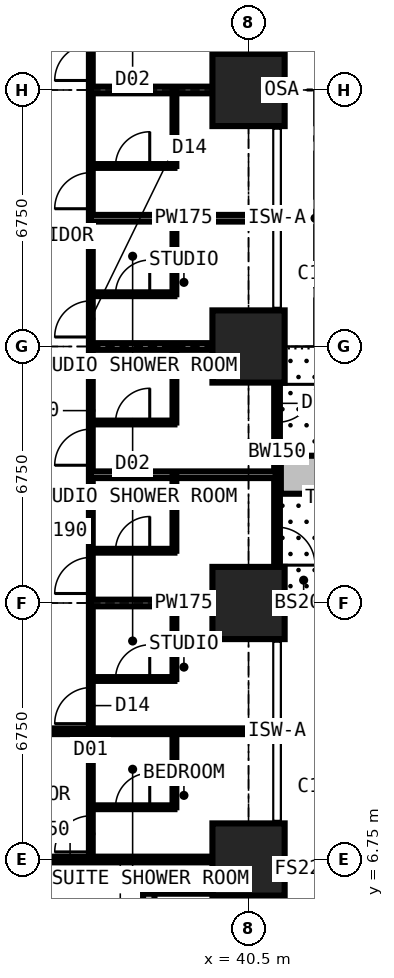
"""IFC4 building model, lengths in metres.
Left out: names, types, materials, properties, quantities, classifications, styles, units other than length and angle.
Written with IfcOpenShell. Run it as: python <this file> out.ifc"""

import sys

from ifc_helpers import new_model, si_unit, direction, frame, frame_2d, origin, origin_2d, place, context, subcontext, project, spatial, rectangle, extrude, element, fill, save


model = new_model("IFC4")
c1 = context("Model", 3, precision=1e-05, world=origin(), true_north=direction((0.0, 1.0)))
c2 = subcontext(c1, "Body", "Model", "MODEL_VIEW")
j1 = project(units=[si_unit("LENGTHUNIT", "METRE"), si_unit("PLANEANGLEUNIT", "RADIAN")], contexts=[c1])
p1 = place(None, origin())
s1 = spatial("IfcSite", under=j1, at=p1, CompositionType="ELEMENT")
p2 = place(p1, origin())
s2 = spatial("IfcBuilding", under=s1, at=p2, CompositionType="ELEMENT")
p3 = place(p2, frame((0.0, 0.0, 32.4)))
s3 = spatial("IfcBuildingStorey", under=s2, at=p3, CompositionType="ELEMENT", Elevation=32.4)
for number, where, z_axis, x_axis in (
    (1, (40.5, 6.75, 0.0), (0.0, 0.0, 1.0), (1.0, 0.0, 0.0)),
    (2, (40.5, 13.5, 0.0), (0.0, 0.0, 1.0), (1.0, 0.0, 0.0)),
    (3, (40.5, 20.25, 0.0), (0.0, 0.0, 1.0), (1.0, 0.0, 0.0)),
    (4, (40.5, 27.0, 0.0), (0.0, 0.0, 1.0), (1.0, 0.0, 0.0)),
):
    element("IfcColumn", number, at=place(p3, frame(where, z_axis=z_axis, x_axis=x_axis)), inside=s3, PredefinedType="COLUMN", context=c2, shape_type="SweptSolid", body=[
        extrude(rectangle(XDim=1.9, YDim=1.9, at=origin_2d()), origin(), (0.0, 0.0, 1.0), 3.6),
    ])
p4 = place(p3, frame((41.25, 20.25, 0.0), z_axis=(0.0, 0.0, 1.0), x_axis=(0.0, -1.0, 0.0)))
e5 = element("IfcWall", 5, at=p4, inside=s3, PredefinedType="SOLIDWALL", context=c2, shape_type="SweptSolid", body=[
    extrude(rectangle(XDim=6.75, YDim=0.15, at=frame_2d((3.375, 0.0))), origin(), (0.0, 0.0, 1.0), 3.375),
])
p5 = place(p4, frame((0.996, 0.0, 0.0)))
e6 = element("IfcOpeningElement", 6, at=p5, cuts=e5, PredefinedType="OPENING", context=c2, shape_type="SweptSolid", body=[
    extrude(rectangle(XDim=1.0, YDim=2.2, at=frame_2d((0.5, 1.1))), frame((0.0, 0.085, 0.0), z_axis=(0.0, -1.0, 0.0), x_axis=(1.0, 0.0, 0.0)), (0.0, 0.0, 1.0), 0.17),
])
p6 = place(p4, frame((2.042, 0.0, 0.9)))
e7 = element("IfcOpeningElement", 7, at=p6, cuts=e5, PredefinedType="OPENING", context=c2, shape_type="SweptSolid", body=[
    extrude(rectangle(XDim=1.2, YDim=1.8, at=frame_2d((0.6, 0.9))), frame((0.0, 0.085, 0.0), z_axis=(0.0, -1.0, 0.0), x_axis=(1.0, 0.0, 0.0)), (0.0, 0.0, 1.0), 0.17),
])
p7 = place(p4, frame((4.754, 0.0, 0.0)))
e8 = element("IfcOpeningElement", 8, at=p7, cuts=e5, PredefinedType="OPENING", context=c2, shape_type="SweptSolid", body=[
    extrude(rectangle(XDim=1.0, YDim=2.2, at=frame_2d((0.5, 1.1))), frame((0.0, 0.085, 0.0), z_axis=(0.0, -1.0, 0.0), x_axis=(1.0, 0.0, 0.0)), (0.0, 0.0, 1.0), 0.17),
])
p8 = place(p4, frame((3.508, 0.0, 0.9)))
e9 = element("IfcOpeningElement", 9, at=p8, cuts=e5, PredefinedType="OPENING", context=c2, shape_type="SweptSolid", body=[
    extrude(rectangle(XDim=1.2, YDim=1.8, at=frame_2d((0.6, 0.9))), frame((0.0, 0.085, 0.0), z_axis=(0.0, -1.0, 0.0), x_axis=(1.0, 0.0, 0.0)), (0.0, 0.0, 1.0), 0.17),
])
p9 = place(p3, frame((37.875, 2.625, 0.0), z_axis=(0.0, 0.0, 1.0), x_axis=(0.0, 1.0, 0.0)))
e10 = element("IfcWall", 10, at=p9, inside=s3, PredefinedType="SOLIDWALL", context=c2, shape_type="SweptSolid", body=[
    extrude(rectangle(XDim=3.375, YDim=0.3, at=frame_2d((1.688, 0.0))), origin(), (0.0, 0.0, 1.0), 3.375),
])
p10 = place(p9, frame((0.788, 0.0, 0.6)))
e11 = element("IfcOpeningElement", 11, at=p10, cuts=e10, PredefinedType="OPENING", context=c2, shape_type="SweptSolid", body=[
    extrude(rectangle(XDim=1.8, YDim=2.1, at=frame_2d((0.9, 1.05))), frame((0.0, 0.16, 0.0), z_axis=(0.0, -1.0, 0.0), x_axis=(1.0, 0.0, 0.0)), (0.0, 0.0, 1.0), 0.32),
])
p11 = place(p3, frame((37.875, 6.0, 0.0), z_axis=(0.0, 0.0, 1.0), x_axis=(1.0, 0.0, 0.0)))
e12 = element("IfcWall", 12, at=p11, inside=s3, PredefinedType="SOLIDWALL", context=c2, shape_type="SweptSolid", body=[
    extrude(rectangle(XDim=3.375, YDim=0.3, at=frame_2d((1.688, 0.0))), origin(), (0.0, 0.0, 1.0), 3.375),
])
p12 = place(p11, frame((0.317, 0.0, 0.9)))
e13 = element("IfcOpeningElement", 13, at=p12, cuts=e12, PredefinedType="OPENING", context=c2, shape_type="SweptSolid", body=[
    extrude(rectangle(XDim=1.2, YDim=1.8, at=frame_2d((0.6, 0.9))), frame((0.0, 0.16, 0.0), z_axis=(0.0, -1.0, 0.0), x_axis=(1.0, 0.0, 0.0)), (0.0, 0.0, 1.0), 0.32),
])
p13 = place(p3, frame((41.35, 16.875, 0.0), z_axis=(0.0, 0.0, 1.0), x_axis=(1.0, 0.0, 0.0)))
e14 = element("IfcWall", 14, at=p13, inside=s3, PredefinedType="USERDEFINED", context=c2, shape_type="SweptSolid", body=[
    extrude(rectangle(XDim=2.2, YDim=1.0, at=frame_2d((1.1, 0.0))), origin(), (0.0, 0.0, 1.0), 0.9),
])
p14 = place(p3, frame((30.375, 6.75, 0.0), z_axis=(0.0, 0.0, 1.0), x_axis=(1.0, 0.0, 0.0)))
e15 = element("IfcWall", 15, at=p14, inside=s3, PredefinedType="PARTITIONING", context=c2, shape_type="SweptSolid", body=[
    extrude(rectangle(XDim=10.859, YDim=0.15, at=frame_2d((5.429, 0.0))), origin(), (0.0, 0.0, 1.0), 2.877),
])
p15 = place(p14, frame((1.4, 0.0, 0.0)))
e16 = element("IfcOpeningElement", 16, at=p15, cuts=e15, PredefinedType="OPENING", context=c2, shape_type="SweptSolid", body=[
    extrude(rectangle(XDim=1.0, YDim=2.2, at=frame_2d((0.5, 1.1))), frame((0.0, 0.085, 0.0), z_axis=(0.0, -1.0, 0.0), x_axis=(1.0, 0.0, 0.0)), (0.0, 0.0, 1.0), 0.17),
])
p16 = place(p3, frame((30.375, 10.125, 0.0), z_axis=(0.0, 0.0, 1.0), x_axis=(1.0, 0.0, 0.0)))
e17 = element("IfcWall", 17, at=p16, inside=s3, PredefinedType="PARTITIONING", context=c2, shape_type="SweptSolid", body=[
    extrude(rectangle(XDim=10.859, YDim=0.15, at=frame_2d((5.429, 0.0))), origin(), (0.0, 0.0, 1.0), 3.375),
])
p17 = place(p16, frame((2.5, 0.0, 0.0)))
e18 = element("IfcOpeningElement", 18, at=p17, cuts=e17, PredefinedType="OPENING", context=c2, shape_type="SweptSolid", body=[
    extrude(rectangle(XDim=1.0, YDim=2.2, at=frame_2d((0.5, 1.1))), frame((0.0, 0.085, 0.0), z_axis=(0.0, -1.0, 0.0), x_axis=(1.0, 0.0, 0.0)), (0.0, 0.0, 1.0), 0.17),
])
p18 = place(p3, frame((36.35, 6.75, 0.0), z_axis=(0.0, 0.0, 1.0), x_axis=(0.0, 1.0, 0.0)))
e19 = element("IfcWall", 19, at=p18, inside=s3, PredefinedType="PARTITIONING", context=c2, shape_type="SweptSolid", body=[
    extrude(rectangle(XDim=23.625, YDim=0.1, at=frame_2d((11.812, 0.0))), origin(), (0.0, 0.0, 1.0), 3.375),
])
p19 = place(p18, frame((0.2, 0.0, 0.0)))
e20 = element("IfcOpeningElement", 20, at=p19, cuts=e19, PredefinedType="OPENING", context=c2, shape_type="SweptSolid", body=[
    extrude(rectangle(XDim=0.95, YDim=2.2, at=frame_2d((0.475, 1.1))), frame((0.0, 0.06, 0.0), z_axis=(0.0, -1.0, 0.0), x_axis=(1.0, 0.0, 0.0)), (0.0, 0.0, 1.0), 0.12),
])
p20 = place(p18, frame((3.575, 0.0, 0.0)))
e21 = element("IfcOpeningElement", 21, at=p20, cuts=e19, PredefinedType="OPENING", context=c2, shape_type="SweptSolid", body=[
    extrude(rectangle(XDim=0.95, YDim=2.2, at=frame_2d((0.475, 1.1))), frame((0.0, 0.06, 0.0), z_axis=(0.0, -1.0, 0.0), x_axis=(1.0, 0.0, 0.0)), (0.0, 0.0, 1.0), 0.12),
])
p21 = place(p18, frame((7.0, 0.0, 0.0)))
e22 = element("IfcOpeningElement", 22, at=p21, cuts=e19, PredefinedType="OPENING", context=c2, shape_type="SweptSolid", body=[
    extrude(rectangle(XDim=0.95, YDim=2.2, at=frame_2d((0.475, 1.1))), frame((0.0, 0.06, 0.0), z_axis=(0.0, -1.0, 0.0), x_axis=(1.0, 0.0, 0.0)), (0.0, 0.0, 1.0), 0.12),
])
p22 = place(p18, frame((10.375, 0.0, 0.0)))
e23 = element("IfcOpeningElement", 23, at=p22, cuts=e19, PredefinedType="OPENING", context=c2, shape_type="SweptSolid", body=[
    extrude(rectangle(XDim=0.95, YDim=2.2, at=frame_2d((0.475, 1.1))), frame((0.0, 0.06, 0.0), z_axis=(0.0, -1.0, 0.0), x_axis=(1.0, 0.0, 0.0)), (0.0, 0.0, 1.0), 0.12),
])
p23 = place(p18, frame((13.75, 0.0, 0.0)))
e24 = element("IfcOpeningElement", 24, at=p23, cuts=e19, PredefinedType="OPENING", context=c2, shape_type="SweptSolid", body=[
    extrude(rectangle(XDim=0.95, YDim=2.2, at=frame_2d((0.475, 1.1))), frame((0.0, 0.06, 0.0), z_axis=(0.0, -1.0, 0.0), x_axis=(1.0, 0.0, 0.0)), (0.0, 0.0, 1.0), 0.12),
])
p24 = place(p18, frame((17.125, 0.0, 0.0)))
e25 = element("IfcOpeningElement", 25, at=p24, cuts=e19, PredefinedType="OPENING", context=c2, shape_type="SweptSolid", body=[
    extrude(rectangle(XDim=0.95, YDim=2.2, at=frame_2d((0.475, 1.1))), frame((0.0, 0.06, 0.0), z_axis=(0.0, -1.0, 0.0), x_axis=(1.0, 0.0, 0.0)), (0.0, 0.0, 1.0), 0.12),
])
p25 = place(p18, frame((20.5, 0.0, 0.0)))
e26 = element("IfcOpeningElement", 26, at=p25, cuts=e19, PredefinedType="OPENING", context=c2, shape_type="SweptSolid", body=[
    extrude(rectangle(XDim=0.95, YDim=2.2, at=frame_2d((0.475, 1.1))), frame((0.0, 0.06, 0.0), z_axis=(0.0, -1.0, 0.0), x_axis=(1.0, 0.0, 0.0)), (0.0, 0.0, 1.0), 0.12),
])
p26 = place(p3, frame((36.35, 8.125, 0.0), z_axis=(0.0, 0.0, 1.0), x_axis=(1.0, 0.0, 0.0)))
e27 = element("IfcWall", 27, at=p26, inside=s3, PredefinedType="PARTITIONING", context=c2, shape_type="SweptSolid", body=[
    extrude(rectangle(XDim=2.2, YDim=0.1, at=frame_2d((1.1, 0.0))), origin(), (0.0, 0.0, 1.0), 3.375),
])
p27 = place(p26, frame((0.65, 0.0, 0.0)))
e28 = element("IfcOpeningElement", 28, at=p27, cuts=e27, PredefinedType="OPENING", context=c2, shape_type="SweptSolid", body=[
    extrude(rectangle(XDim=0.9, YDim=2.2, at=frame_2d((0.45, 1.1))), frame((0.0, 0.06, 0.0), z_axis=(0.0, -1.0, 0.0), x_axis=(1.0, 0.0, 0.0)), (0.0, 0.0, 1.0), 0.12),
])
p28 = place(p3, frame((36.35, 11.5, 0.0), z_axis=(0.0, 0.0, 1.0), x_axis=(1.0, 0.0, 0.0)))
e29 = element("IfcWall", 29, at=p28, inside=s3, PredefinedType="PARTITIONING", context=c2, shape_type="SweptSolid", body=[
    extrude(rectangle(XDim=2.2, YDim=0.1, at=frame_2d((1.1, 0.0))), origin(), (0.0, 0.0, 1.0), 3.375),
])
p29 = place(p28, frame((0.65, 0.0, 0.0)))
e30 = element("IfcOpeningElement", 30, at=p29, cuts=e29, PredefinedType="OPENING", context=c2, shape_type="SweptSolid", body=[
    extrude(rectangle(XDim=0.9, YDim=2.2, at=frame_2d((0.45, 1.1))), frame((0.0, 0.06, 0.0), z_axis=(0.0, -1.0, 0.0), x_axis=(1.0, 0.0, 0.0)), (0.0, 0.0, 1.0), 0.12),
])
p30 = place(p3, frame((36.35, 13.5, 0.0), z_axis=(0.0, 0.0, 1.0), x_axis=(1.0, 0.0, 0.0)))
e31 = element("IfcWall", 31, at=p30, inside=s3, PredefinedType="PARTITIONING", context=c2, shape_type="SweptSolid", body=[
    extrude(rectangle(XDim=4.884, YDim=0.175, at=frame_2d((2.442, 0.0))), origin(), (0.0, 0.0, 1.0), 2.877),
])
p31 = place(p3, frame((36.35, 14.875, 0.0), z_axis=(0.0, 0.0, 1.0), x_axis=(1.0, 0.0, 0.0)))
e32 = element("IfcWall", 32, at=p31, inside=s3, PredefinedType="PARTITIONING", context=c2, shape_type="SweptSolid", body=[
    extrude(rectangle(XDim=2.2, YDim=0.1, at=frame_2d((1.1, 0.0))), origin(), (0.0, 0.0, 1.0), 3.375),
])
p32 = place(p31, frame((0.65, 0.0, 0.0)))
e33 = element("IfcOpeningElement", 33, at=p32, cuts=e32, PredefinedType="OPENING", context=c2, shape_type="SweptSolid", body=[
    extrude(rectangle(XDim=0.9, YDim=2.2, at=frame_2d((0.45, 1.1))), frame((0.0, 0.06, 0.0), z_axis=(0.0, -1.0, 0.0), x_axis=(1.0, 0.0, 0.0)), (0.0, 0.0, 1.0), 0.12),
])
p33 = place(p3, frame((36.35, 16.875, 0.0), z_axis=(0.0, 0.0, 1.0), x_axis=(1.0, 0.0, 0.0)))
e34 = element("IfcWall", 34, at=p33, inside=s3, PredefinedType="PARTITIONING", context=c2, shape_type="SweptSolid", body=[
    extrude(rectangle(XDim=4.884, YDim=0.175, at=frame_2d((2.442, 0.0))), origin(), (0.0, 0.0, 1.0), 3.375),
])
p34 = place(p3, frame((36.35, 18.25, 0.0), z_axis=(0.0, 0.0, 1.0), x_axis=(1.0, 0.0, 0.0)))
e35 = element("IfcWall", 35, at=p34, inside=s3, PredefinedType="PARTITIONING", context=c2, shape_type="SweptSolid", body=[
    extrude(rectangle(XDim=2.2, YDim=0.1, at=frame_2d((1.1, 0.0))), origin(), (0.0, 0.0, 1.0), 3.375),
])
p35 = place(p34, frame((0.65, 0.0, 0.0)))
e36 = element("IfcOpeningElement", 36, at=p35, cuts=e35, PredefinedType="OPENING", context=c2, shape_type="SweptSolid", body=[
    extrude(rectangle(XDim=0.9, YDim=2.2, at=frame_2d((0.45, 1.1))), frame((0.0, 0.06, 0.0), z_axis=(0.0, -1.0, 0.0), x_axis=(1.0, 0.0, 0.0)), (0.0, 0.0, 1.0), 0.12),
])
p36 = place(p3, frame((36.35, 20.25, 0.0), z_axis=(0.0, 0.0, 1.0), x_axis=(1.0, 0.0, 0.0)))
e37 = element("IfcWall", 37, at=p36, inside=s3, PredefinedType="PARTITIONING", context=c2, shape_type="SweptSolid", body=[
    extrude(rectangle(XDim=4.884, YDim=0.175, at=frame_2d((2.442, 0.0))), origin(), (0.0, 0.0, 1.0), 2.61),
])
p37 = place(p3, frame((36.35, 21.625, 0.0), z_axis=(0.0, 0.0, 1.0), x_axis=(1.0, 0.0, 0.0)))
e38 = element("IfcWall", 38, at=p37, inside=s3, PredefinedType="PARTITIONING", context=c2, shape_type="SweptSolid", body=[
    extrude(rectangle(XDim=2.2, YDim=0.1, at=frame_2d((1.1, 0.0))), origin(), (0.0, 0.0, 1.0), 3.375),
])
p38 = place(p37, frame((0.65, 0.0, 0.0)))
e39 = element("IfcOpeningElement", 39, at=p38, cuts=e38, PredefinedType="OPENING", context=c2, shape_type="SweptSolid", body=[
    extrude(rectangle(XDim=0.9, YDim=2.2, at=frame_2d((0.45, 1.1))), frame((0.0, 0.06, 0.0), z_axis=(0.0, -1.0, 0.0), x_axis=(1.0, 0.0, 0.0)), (0.0, 0.0, 1.0), 0.12),
])
p39 = place(p3, frame((36.35, 23.625, 0.0), z_axis=(0.0, 0.0, 1.0), x_axis=(1.0, 0.0, 0.0)))
e40 = element("IfcWall", 40, at=p39, inside=s3, PredefinedType="PARTITIONING", context=c2, shape_type="SweptSolid", body=[
    extrude(rectangle(XDim=4.884, YDim=0.175, at=frame_2d((2.442, 0.0))), origin(), (0.0, 0.0, 1.0), 3.375),
])
p40 = place(p3, frame((36.35, 25.0, 0.0), z_axis=(0.0, 0.0, 1.0), x_axis=(1.0, 0.0, 0.0)))
e41 = element("IfcWall", 41, at=p40, inside=s3, PredefinedType="PARTITIONING", context=c2, shape_type="SweptSolid", body=[
    extrude(rectangle(XDim=2.2, YDim=0.1, at=frame_2d((1.1, 0.0))), origin(), (0.0, 0.0, 1.0), 3.375),
])
p41 = place(p40, frame((0.65, 0.0, 0.0)))
e42 = element("IfcOpeningElement", 42, at=p41, cuts=e41, PredefinedType="OPENING", context=c2, shape_type="SweptSolid", body=[
    extrude(rectangle(XDim=0.9, YDim=2.2, at=frame_2d((0.45, 1.1))), frame((0.0, 0.06, 0.0), z_axis=(0.0, -1.0, 0.0), x_axis=(1.0, 0.0, 0.0)), (0.0, 0.0, 1.0), 0.12),
])
p42 = place(p3, frame((36.35, 27.0, 0.0), z_axis=(0.0, 0.0, 1.0), x_axis=(1.0, 0.0, 0.0)))
e43 = element("IfcWall", 43, at=p42, inside=s3, PredefinedType="PARTITIONING", context=c2, shape_type="SweptSolid", body=[
    extrude(rectangle(XDim=4.884, YDim=0.175, at=frame_2d((2.442, 0.0))), origin(), (0.0, 0.0, 1.0), 2.61),
])
for number, where, z_axis, x_axis in (
    (44, (38.55, 8.125, 0.0), (0.0, 0.0, 1.0), (0.0, 1.0, 0.0)),
    (45, (38.55, 11.5, 0.0), (0.0, 0.0, 1.0), (0.0, 1.0, 0.0)),
    (46, (38.55, 14.875, 0.0), (0.0, 0.0, 1.0), (0.0, 1.0, 0.0)),
    (47, (38.55, 18.25, 0.0), (0.0, 0.0, 1.0), (0.0, 1.0, 0.0)),
    (48, (38.55, 21.625, 0.0), (0.0, 0.0, 1.0), (0.0, 1.0, 0.0)),
    (49, (38.55, 25.0, 0.0), (0.0, 0.0, 1.0), (0.0, 1.0, 0.0)),
):
    element("IfcWall", number, at=place(p3, frame(where, z_axis=z_axis, x_axis=x_axis)), inside=s3, PredefinedType="PARTITIONING", context=c2, shape_type="SweptSolid", body=[
        extrude(rectangle(XDim=2.0, YDim=0.1, at=frame_2d((1.0, 0.0))), origin(), (0.0, 0.0, 1.0), 3.375),
    ])
p43 = place(p5, origin())
e50 = element("IfcDoor", 50, at=p43, inside=s3, OperationType="SINGLE_SWING_LEFT", PredefinedType="DOOR", context=c2, shape_type="SweptSolid", body=[
    extrude(rectangle(XDim=1.0, YDim=2.2, at=frame_2d((0.5, 1.1))), frame((0.0, 0.025, 0.0), z_axis=(0.0, -1.0, 0.0), x_axis=(1.0, 0.0, 0.0)), (0.0, 0.0, 1.0), 0.05),
])
fill(e6, e50)
p44 = place(p6, origin())
e51 = element("IfcWindow", 51, at=p44, inside=s3, PartitioningType="SINGLE_PANEL", PredefinedType="WINDOW", context=c2, shape_type="SweptSolid", body=[
    extrude(rectangle(XDim=1.2, YDim=1.8, at=frame_2d((0.6, 0.9))), frame((0.0, 0.03, 0.0), z_axis=(0.0, -1.0, 0.0), x_axis=(1.0, 0.0, 0.0)), (0.0, 0.0, 1.0), 0.06),
])
fill(e7, e51)
p45 = place(p7, origin())
e52 = element("IfcDoor", 52, at=p45, inside=s3, OperationType="SINGLE_SWING_RIGHT", PredefinedType="DOOR", context=c2, shape_type="SweptSolid", body=[
    extrude(rectangle(XDim=1.0, YDim=2.2, at=frame_2d((0.5, 1.1))), frame((0.0, 0.025, 0.0), z_axis=(0.0, -1.0, 0.0), x_axis=(1.0, 0.0, 0.0)), (0.0, 0.0, 1.0), 0.05),
])
fill(e8, e52)
p46 = place(p8, origin())
e53 = element("IfcWindow", 53, at=p46, inside=s3, PartitioningType="SINGLE_PANEL", PredefinedType="WINDOW", context=c2, shape_type="SweptSolid", body=[
    extrude(rectangle(XDim=1.2, YDim=1.8, at=frame_2d((0.6, 0.9))), frame((0.0, 0.03, 0.0), z_axis=(0.0, -1.0, 0.0), x_axis=(1.0, 0.0, 0.0)), (0.0, 0.0, 1.0), 0.06),
])
fill(e9, e53)
p47 = place(p12, origin())
e54 = element("IfcWindow", 54, at=p47, inside=s3, PartitioningType="SINGLE_PANEL", PredefinedType="WINDOW", context=c2, shape_type="SweptSolid", body=[
    extrude(rectangle(XDim=1.2, YDim=1.8, at=frame_2d((0.6, 0.9))), frame((0.0, 0.03, 0.0), z_axis=(0.0, -1.0, 0.0), x_axis=(1.0, 0.0, 0.0)), (0.0, 0.0, 1.0), 0.06),
])
fill(e13, e54)
p48 = place(p19, origin())
e55 = element("IfcDoor", 55, at=p48, inside=s3, OperationType="SINGLE_SWING_LEFT", PredefinedType="DOOR", context=c2, shape_type="SweptSolid", body=[
    extrude(rectangle(XDim=0.95, YDim=2.2, at=frame_2d((0.475, 1.1))), frame((0.0, 0.025, 0.0), z_axis=(0.0, -1.0, 0.0), x_axis=(1.0, 0.0, 0.0)), (0.0, 0.0, 1.0), 0.05),
])
fill(e20, e55)
p49 = place(p27, origin())
e56 = element("IfcDoor", 56, at=p49, inside=s3, OperationType="SINGLE_SWING_RIGHT", PredefinedType="DOOR", context=c2, shape_type="SweptSolid", body=[
    extrude(rectangle(XDim=0.9, YDim=2.2, at=frame_2d((0.45, 1.1))), frame((0.0, 0.025, 0.0), z_axis=(0.0, -1.0, 0.0), x_axis=(1.0, 0.0, 0.0)), (0.0, 0.0, 1.0), 0.05),
])
fill(e28, e56)
p50 = place(p20, origin())
e57 = element("IfcDoor", 57, at=p50, inside=s3, OperationType="SINGLE_SWING_LEFT", PredefinedType="DOOR", context=c2, shape_type="SweptSolid", body=[
    extrude(rectangle(XDim=0.95, YDim=2.2, at=frame_2d((0.475, 1.1))), frame((0.0, 0.025, 0.0), z_axis=(0.0, -1.0, 0.0), x_axis=(1.0, 0.0, 0.0)), (0.0, 0.0, 1.0), 0.05),
])
fill(e21, e57)
p51 = place(p29, origin())
e58 = element("IfcDoor", 58, at=p51, inside=s3, OperationType="SINGLE_SWING_RIGHT", PredefinedType="DOOR", context=c2, shape_type="SweptSolid", body=[
    extrude(rectangle(XDim=0.9, YDim=2.2, at=frame_2d((0.45, 1.1))), frame((0.0, 0.025, 0.0), z_axis=(0.0, -1.0, 0.0), x_axis=(1.0, 0.0, 0.0)), (0.0, 0.0, 1.0), 0.05),
])
fill(e30, e58)
p52 = place(p21, origin())
e59 = element("IfcDoor", 59, at=p52, inside=s3, OperationType="SINGLE_SWING_LEFT", PredefinedType="DOOR", context=c2, shape_type="SweptSolid", body=[
    extrude(rectangle(XDim=0.95, YDim=2.2, at=frame_2d((0.475, 1.1))), frame((0.0, 0.025, 0.0), z_axis=(0.0, -1.0, 0.0), x_axis=(1.0, 0.0, 0.0)), (0.0, 0.0, 1.0), 0.05),
])
fill(e22, e59)
p53 = place(p32, origin())
e60 = element("IfcDoor", 60, at=p53, inside=s3, OperationType="SINGLE_SWING_RIGHT", PredefinedType="DOOR", context=c2, shape_type="SweptSolid", body=[
    extrude(rectangle(XDim=0.9, YDim=2.2, at=frame_2d((0.45, 1.1))), frame((0.0, 0.025, 0.0), z_axis=(0.0, -1.0, 0.0), x_axis=(1.0, 0.0, 0.0)), (0.0, 0.0, 1.0), 0.05),
])
fill(e33, e60)
p54 = place(p22, origin())
e61 = element("IfcDoor", 61, at=p54, inside=s3, OperationType="SINGLE_SWING_LEFT", PredefinedType="DOOR", context=c2, shape_type="SweptSolid", body=[
    extrude(rectangle(XDim=0.95, YDim=2.2, at=frame_2d((0.475, 1.1))), frame((0.0, 0.025, 0.0), z_axis=(0.0, -1.0, 0.0), x_axis=(1.0, 0.0, 0.0)), (0.0, 0.0, 1.0), 0.05),
])
fill(e23, e61)
p55 = place(p35, origin())
e62 = element("IfcDoor", 62, at=p55, inside=s3, OperationType="SINGLE_SWING_RIGHT", PredefinedType="DOOR", context=c2, shape_type="SweptSolid", body=[
    extrude(rectangle(XDim=0.9, YDim=2.2, at=frame_2d((0.45, 1.1))), frame((0.0, 0.025, 0.0), z_axis=(0.0, -1.0, 0.0), x_axis=(1.0, 0.0, 0.0)), (0.0, 0.0, 1.0), 0.05),
])
fill(e36, e62)
p56 = place(p23, origin())
e63 = element("IfcDoor", 63, at=p56, inside=s3, OperationType="SINGLE_SWING_LEFT", PredefinedType="DOOR", context=c2, shape_type="SweptSolid", body=[
    extrude(rectangle(XDim=0.95, YDim=2.2, at=frame_2d((0.475, 1.1))), frame((0.0, 0.025, 0.0), z_axis=(0.0, -1.0, 0.0), x_axis=(1.0, 0.0, 0.0)), (0.0, 0.0, 1.0), 0.05),
])
fill(e24, e63)
p57 = place(p38, origin())
e64 = element("IfcDoor", 64, at=p57, inside=s3, OperationType="SINGLE_SWING_RIGHT", PredefinedType="DOOR", context=c2, shape_type="SweptSolid", body=[
    extrude(rectangle(XDim=0.9, YDim=2.2, at=frame_2d((0.45, 1.1))), frame((0.0, 0.025, 0.0), z_axis=(0.0, -1.0, 0.0), x_axis=(1.0, 0.0, 0.0)), (0.0, 0.0, 1.0), 0.05),
])
fill(e39, e64)
p58 = place(p24, origin())
e65 = element("IfcDoor", 65, at=p58, inside=s3, OperationType="SINGLE_SWING_LEFT", PredefinedType="DOOR", context=c2, shape_type="SweptSolid", body=[
    extrude(rectangle(XDim=0.95, YDim=2.2, at=frame_2d((0.475, 1.1))), frame((0.0, 0.025, 0.0), z_axis=(0.0, -1.0, 0.0), x_axis=(1.0, 0.0, 0.0)), (0.0, 0.0, 1.0), 0.05),
])
fill(e25, e65)
p59 = place(p41, origin())
e66 = element("IfcDoor", 66, at=p59, inside=s3, OperationType="SINGLE_SWING_RIGHT", PredefinedType="DOOR", context=c2, shape_type="SweptSolid", body=[
    extrude(rectangle(XDim=0.9, YDim=2.2, at=frame_2d((0.45, 1.1))), frame((0.0, 0.025, 0.0), z_axis=(0.0, -1.0, 0.0), x_axis=(1.0, 0.0, 0.0)), (0.0, 0.0, 1.0), 0.05),
])
fill(e42, e66)
p60 = place(p25, origin())
e67 = element("IfcDoor", 67, at=p60, inside=s3, OperationType="SINGLE_SWING_LEFT", PredefinedType="DOOR", context=c2, shape_type="SweptSolid", body=[
    extrude(rectangle(XDim=0.95, YDim=2.2, at=frame_2d((0.475, 1.1))), frame((0.0, 0.025, 0.0), z_axis=(0.0, -1.0, 0.0), x_axis=(1.0, 0.0, 0.0)), (0.0, 0.0, 1.0), 0.05),
])
fill(e26, e67)
save(model, sys.argv[1])
